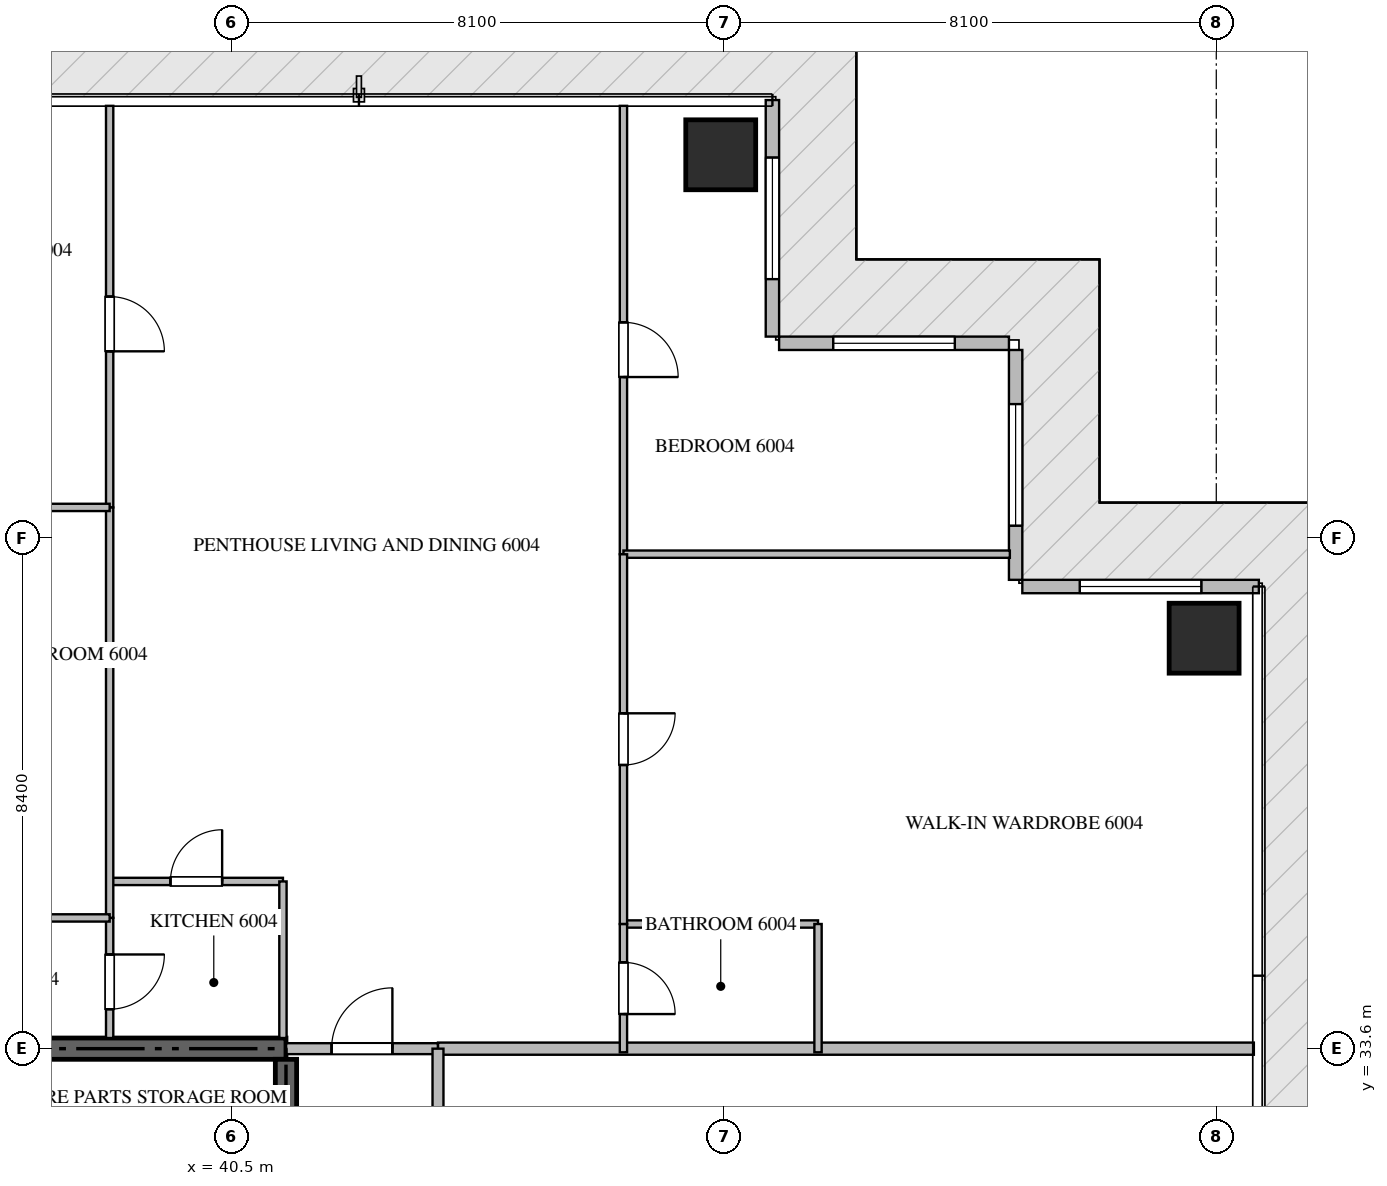
"""IFC4 building model, lengths in metres.
Left out: names, types, materials, properties, quantities, classifications, styles, units other than length and angle.
Written with IfcOpenShell. Run it as: python <this file> out.ifc"""

import sys

from ifc_helpers import new_model, si_unit, direction, frame, frame_2d, origin, origin_2d, place, context, subcontext, project, spatial, rectangle, extrude, source, transform, mapped, element, fill, save


model = new_model("IFC4")
c1 = context("Model", 3, precision=1e-05, world=origin(), true_north=direction((0.0, 1.0)))
c2 = subcontext(c1, "Body", "Model", "MODEL_VIEW")
j1 = project(units=[si_unit("LENGTHUNIT", "METRE"), si_unit("PLANEANGLEUNIT", "RADIAN")], contexts=[c1])
p1 = place(None, origin())
s1 = spatial("IfcSite", under=j1, at=p1, CompositionType="ELEMENT")
p2 = place(p1, origin())
s2 = spatial("IfcBuilding", under=s1, at=p2, CompositionType="ELEMENT")
p3 = place(p2, frame((0.0, 0.0, 241.25)))
s3 = spatial("IfcBuildingStorey", under=s2, at=p3, CompositionType="ELEMENT", Elevation=241.25)
p4 = place(p3, frame((41.4, 33.6, -0.26), z_axis=(0.0, 0.0, 1.0), x_axis=(-1.0, 0.0, 0.0)))
e1 = element("IfcWall", 1, at=p4, inside=s3, PredefinedType="SHEAR", context=c2, shape_type="SweptSolid", body=[
    extrude(rectangle(XDim=18.0, YDim=0.35, at=frame_2d((9.0, 0.0))), origin(), (0.0, 0.0, 1.0), 3.848),
])
p5 = place(p3, frame((41.4, 27.75, -0.26), z_axis=(0.0, 0.0, 1.0), x_axis=(0.0, 1.0, 0.0)))
e2 = element("IfcWall", 2, at=p5, inside=s3, PredefinedType="SHEAR", context=c2, shape_type="SweptSolid", body=[
    extrude(rectangle(XDim=5.675, YDim=0.35, at=frame_2d((2.837, 0.0))), origin(), (0.0, 0.0, 1.0), 3.848),
])
m1 = source(origin(), c2, "Body", "SweptSolid", [
    extrude(rectangle(XDim=1.15, YDim=1.15, at=origin_2d()), origin(), (0.0, 0.0, 1.0), 3.85),
])
for number, where, z_axis, x_axis in (
    (3, (48.55, 48.3, -0.26), (0.0, 0.0, 1.0), (1.0, 0.0, 0.0)),
    (4, (56.5, 40.35, -0.26), (0.0, 0.0, 1.0), (1.0, 0.0, 0.0)),
):
    element("IfcColumn", number, at=place(p3, frame(where, z_axis=z_axis, x_axis=x_axis)), inside=s3, PredefinedType="COLUMN", context=c2, shape_type="MappedRepresentation", body=[
        mapped(m1, transform((0.0, 0.0, 0.0), scale=1.0)),
    ])
p6 = place(p3, frame((57.4, 41.2, 0.0), z_axis=(0.0, 0.0, 1.0), x_axis=(-1.0, 0.0, 0.0)))
e5 = element("IfcWall", 5, at=p6, inside=s3, PredefinedType="ELEMENTEDWALL", context=c2, shape_type="SweptSolid", body=[
    extrude(rectangle(XDim=3.89, YDim=0.22, at=frame_2d((1.945, 0.0))), origin(), (0.0, 0.0, 1.0), 3.575),
])
p7 = place(p6, frame((0.945, 0.0, 0.65)))
e6 = element("IfcOpeningElement", 6, at=p7, cuts=e5, PredefinedType="OPENING", context=c2, shape_type="SweptSolid", body=[
    extrude(rectangle(XDim=2.0, YDim=2.2, at=frame_2d((1.0, 1.1))), frame((0.0, 0.12, 0.0), z_axis=(0.0, -1.0, 0.0), x_axis=(1.0, 0.0, 0.0)), (0.0, 0.0, 1.0), 0.24),
])
p8 = place(p3, frame((53.4, 41.31, 0.0), z_axis=(0.0, 0.0, 1.0), x_axis=(0.0, 1.0, 0.0)))
e7 = element("IfcWall", 7, at=p8, inside=s3, PredefinedType="ELEMENTEDWALL", context=c2, shape_type="SweptSolid", body=[
    extrude(rectangle(XDim=3.78, YDim=0.22, at=frame_2d((1.89, 0.0))), origin(), (0.0, 0.0, 1.0), 3.575),
])
p9 = place(p8, frame((0.89, 0.0, 0.65)))
e8 = element("IfcOpeningElement", 8, at=p9, cuts=e7, PredefinedType="OPENING", context=c2, shape_type="SweptSolid", body=[
    extrude(rectangle(XDim=2.0, YDim=2.2, at=frame_2d((1.0, 1.1))), frame((0.0, 0.12, 0.0), z_axis=(0.0, -1.0, 0.0), x_axis=(1.0, 0.0, 0.0)), (0.0, 0.0, 1.0), 0.24),
])
p10 = place(p3, frame((53.29, 45.2, 0.0), z_axis=(0.0, 0.0, 1.0), x_axis=(-1.0, 0.0, 0.0)))
e9 = element("IfcWall", 9, at=p10, inside=s3, PredefinedType="ELEMENTEDWALL", context=c2, shape_type="SweptSolid", body=[
    extrude(rectangle(XDim=3.78, YDim=0.22, at=frame_2d((1.89, 0.0))), origin(), (0.0, 0.0, 1.0), 3.575),
])
p11 = place(p10, frame((0.89, 0.0, 0.65)))
e10 = element("IfcOpeningElement", 10, at=p11, cuts=e9, PredefinedType="OPENING", context=c2, shape_type="SweptSolid", body=[
    extrude(rectangle(XDim=2.0, YDim=2.2, at=frame_2d((1.0, 1.1))), frame((0.0, 0.12, 0.0), z_axis=(0.0, -1.0, 0.0), x_axis=(1.0, 0.0, 0.0)), (0.0, 0.0, 1.0), 0.24),
])
p12 = place(p3, frame((49.4, 45.31, 0.0), z_axis=(0.0, 0.0, 1.0), x_axis=(0.0, 1.0, 0.0)))
e11 = element("IfcWall", 11, at=p12, inside=s3, PredefinedType="ELEMENTEDWALL", context=c2, shape_type="SweptSolid", body=[
    extrude(rectangle(XDim=3.89, YDim=0.22, at=frame_2d((1.945, 0.0))), origin(), (0.0, 0.0, 1.0), 3.575),
])
p13 = place(p12, frame((0.945, 0.0, 0.65)))
e12 = element("IfcOpeningElement", 12, at=p13, cuts=e11, PredefinedType="OPENING", context=c2, shape_type="SweptSolid", body=[
    extrude(rectangle(XDim=2.0, YDim=2.2, at=frame_2d((1.0, 1.1))), frame((0.0, 0.12, 0.0), z_axis=(0.0, -1.0, 0.0), x_axis=(1.0, 0.0, 0.0)), (0.0, 0.0, 1.0), 0.24),
])
p14 = place(p3, frame((43.9, 33.6, 0.0), z_axis=(0.0, 0.0, 1.0), x_axis=(1.0, 0.0, 0.0)))
e13 = element("IfcWall", 13, at=p14, inside=s3, PredefinedType="PARTITIONING", context=c2, shape_type="SweptSolid", body=[
    extrude(rectangle(XDim=13.418, YDim=0.2, at=frame_2d((6.709, 0.0))), origin(), (0.0, 0.0, 1.0), 3.59),
])
p15 = place(p3, frame((41.402, 33.6, 0.0), z_axis=(0.0, 0.0, 1.0), x_axis=(1.0, 0.0, 0.0)))
e14 = element("IfcWall", 14, at=p15, inside=s3, PredefinedType="PARTITIONING", context=c2, shape_type="SweptSolid", body=[
    extrude(rectangle(XDim=2.496, YDim=0.18, at=frame_2d((1.248, 0.0))), origin(), (0.0, 0.0, 1.0), 3.59),
])
p16 = place(p15, frame((0.748, 0.0, 0.0)))
e15 = element("IfcOpeningElement", 15, at=p16, cuts=e14, PredefinedType="OPENING", context=c2, shape_type="SweptSolid", body=[
    extrude(rectangle(XDim=1.0, YDim=2.15, at=frame_2d((0.5, 1.075))), frame((0.0, 0.1, 0.0), z_axis=(0.0, -1.0, 0.0), x_axis=(1.0, 0.0, 0.0)), (0.0, 0.0, 1.0), 0.2),
])
p17 = place(p3, frame((43.9, 16.8, 0.0), z_axis=(0.0, 0.0, 1.0), x_axis=(0.0, 1.0, 0.0)))
e16 = element("IfcWall", 16, at=p17, inside=s3, PredefinedType="PARTITIONING", context=c2, shape_type="SweptSolid", body=[
    extrude(rectangle(XDim=16.8, YDim=0.18, at=frame_2d((8.4, 0.0))), origin(), (0.0, 0.0, 1.0), 3.59),
])
p18 = place(p17, frame((4.993, 0.0, 0.0)))
e17 = element("IfcOpeningElement", 17, at=p18, cuts=e16, PredefinedType="OPENING", context=c2, shape_type="SweptSolid", body=[
    extrude(rectangle(XDim=1.0, YDim=2.15, at=frame_2d((0.5, 1.075))), frame((0.0, 0.1, 0.0), z_axis=(0.0, -1.0, 0.0), x_axis=(1.0, 0.0, 0.0)), (0.0, 0.0, 1.0), 0.2),
])
p19 = place(p17, frame((13.351, 0.0, 0.0)))
e18 = element("IfcOpeningElement", 18, at=p19, cuts=e16, PredefinedType="OPENING", context=c2, shape_type="SweptSolid", body=[
    extrude(rectangle(XDim=1.0, YDim=2.15, at=frame_2d((0.5, 1.075))), frame((0.0, 0.1, 0.0), z_axis=(0.0, -1.0, 0.0), x_axis=(1.0, 0.0, 0.0)), (0.0, 0.0, 1.0), 0.2),
])
p20 = place(p3, frame((38.5, 36.35, 0.0), z_axis=(0.0, 0.0, 1.0), x_axis=(1.0, 0.0, 0.0)))
e19 = element("IfcWall", 19, at=p20, inside=s3, PredefinedType="PARTITIONING", context=c2, shape_type="SweptSolid", body=[
    extrude(rectangle(XDim=2.85, YDim=0.12, at=frame_2d((1.425, 0.0))), origin(), (0.0, 0.0, 1.0), 3.59),
])
p21 = place(p20, frame((1.0, 0.0, 0.0)))
e20 = element("IfcOpeningElement", 20, at=p21, cuts=e19, PredefinedType="OPENING", context=c2, shape_type="SweptSolid", body=[
    extrude(rectangle(XDim=0.85, YDim=2.1, at=frame_2d((0.425, 1.05))), frame((0.0, 0.07, 0.0), z_axis=(0.0, -1.0, 0.0), x_axis=(1.0, 0.0, 0.0)), (0.0, 0.0, 1.0), 0.14),
])
p22 = place(p3, frame((41.35, 36.35, 0.0), z_axis=(0.0, 0.0, 1.0), x_axis=(0.0, -1.0, 0.0)))
e21 = element("IfcWall", 21, at=p22, inside=s3, PredefinedType="PARTITIONING", context=c2, shape_type="SweptSolid", body=[
    extrude(rectangle(XDim=2.575, YDim=0.12, at=frame_2d((1.288, 0.0))), origin(), (0.0, 0.0, 1.0), 3.59),
])
p23 = place(p3, frame((38.5, 35.75, 0.0), z_axis=(0.0, 0.0, 1.0), x_axis=(0.0, -1.0, 0.0)))
e22 = element("IfcWall", 22, at=p23, inside=s3, PredefinedType="PARTITIONING", context=c2, shape_type="SweptSolid", body=[
    extrude(rectangle(XDim=1.975, YDim=0.12, at=frame_2d((0.988, 0.0))), origin(), (0.0, 0.0, 1.0), 3.59),
])
p24 = place(p23, frame((0.601, 0.0, 0.0)))
e23 = element("IfcOpeningElement", 23, at=p24, cuts=e22, PredefinedType="OPENING", context=c2, shape_type="SweptSolid", body=[
    extrude(rectangle(XDim=0.9, YDim=2.1, at=frame_2d((0.45, 1.05))), frame((0.0, 0.07, 0.0), z_axis=(0.0, -1.0, 0.0), x_axis=(1.0, 0.0, 0.0)), (0.0, 0.0, 1.0), 0.14),
])
p25 = place(p3, frame((38.5, 49.105, 0.0), z_axis=(0.0, 0.0, 1.0), x_axis=(0.0, -1.0, 0.0)))
e24 = element("IfcWall", 24, at=p25, inside=s3, PredefinedType="PARTITIONING", context=c2, shape_type="SweptSolid", body=[
    extrude(rectangle(XDim=6.604, YDim=0.12, at=frame_2d((3.302, 0.0))), origin(), (0.0, 0.0, 1.0), 3.59),
])
p26 = place(p25, frame((3.137, 0.0, 0.0)))
e25 = element("IfcOpeningElement", 25, at=p26, cuts=e24, PredefinedType="OPENING", context=c2, shape_type="SweptSolid", body=[
    extrude(rectangle(XDim=0.9, YDim=2.1, at=frame_2d((0.45, 1.05))), frame((0.0, 0.07, 0.0), z_axis=(0.0, -1.0, 0.0), x_axis=(1.0, 0.0, 0.0)), (0.0, 0.0, 1.0), 0.14),
])
p27 = place(p3, frame((38.5, 42.499, 0.0), z_axis=(0.0, 0.0, 1.0), x_axis=(0.0, -1.0, 0.0)))
e26 = element("IfcWall", 26, at=p27, inside=s3, PredefinedType="PARTITIONING", context=c2, shape_type="SweptSolid", body=[
    extrude(rectangle(XDim=6.747, YDim=0.12, at=frame_2d((3.374, 0.0))), origin(), (0.0, 0.0, 1.0), 3.59),
])
p28 = place(p3, frame((33.38, 42.501, 0.0), z_axis=(0.0, 0.0, 1.0), x_axis=(1.0, 0.0, 0.0)))
e27 = element("IfcWall", 27, at=p28, inside=s3, PredefinedType="PARTITIONING", context=c2, shape_type="SweptSolid", body=[
    extrude(rectangle(XDim=5.12, YDim=0.12, at=frame_2d((2.56, 0.0))), origin(), (0.0, 0.0, 1.0), 3.59),
])
p29 = place(p3, frame((35.482, 35.75, 0.0), z_axis=(0.0, 0.0, 1.0), x_axis=(1.0, 0.0, 0.0)))
e28 = element("IfcWall", 28, at=p29, inside=s3, PredefinedType="PARTITIONING", context=c2, shape_type="SweptSolid", body=[
    extrude(rectangle(XDim=3.018, YDim=0.12, at=frame_2d((1.509, 0.0))), origin(), (0.0, 0.0, 1.0), 3.59),
])
p30 = place(p29, frame((1.084, 0.0, 0.0)))
e29 = element("IfcOpeningElement", 29, at=p30, cuts=e28, PredefinedType="OPENING", context=c2, shape_type="SweptSolid", body=[
    extrude(rectangle(XDim=0.85, YDim=2.1, at=frame_2d((0.425, 1.05))), frame((0.0, 0.07, 0.0), z_axis=(0.0, -1.0, 0.0), x_axis=(1.0, 0.0, 0.0)), (0.0, 0.0, 1.0), 0.14),
])
p31 = place(p3, frame((46.95, 49.105, 0.0), z_axis=(0.0, 0.0, 1.0), x_axis=(0.0, -1.0, 0.0)))
e30 = element("IfcWall", 30, at=p31, inside=s3, PredefinedType="PARTITIONING", context=c2, shape_type="SweptSolid", body=[
    extrude(rectangle(XDim=7.373, YDim=0.12, at=frame_2d((3.687, 0.0))), origin(), (0.0, 0.0, 1.0), 3.59),
])
p32 = place(p31, frame((3.56, 0.0, 0.0)))
e31 = element("IfcOpeningElement", 31, at=p32, cuts=e30, PredefinedType="OPENING", context=c2, shape_type="SweptSolid", body=[
    extrude(rectangle(XDim=0.9, YDim=2.1, at=frame_2d((0.45, 1.05))), frame((0.0, 0.07, 0.0), z_axis=(0.0, -1.0, 0.0), x_axis=(1.0, 0.0, 0.0)), (0.0, 0.0, 1.0), 0.14),
])
p33 = place(p3, frame((46.95, 41.732, 0.0), z_axis=(0.0, 0.0, 1.0), x_axis=(1.0, 0.0, 0.0)))
e32 = element("IfcWall", 32, at=p33, inside=s3, PredefinedType="PARTITIONING", context=c2, shape_type="SweptSolid", body=[
    extrude(rectangle(XDim=6.355, YDim=0.12, at=frame_2d((3.177, 0.0))), origin(), (0.0, 0.0, 1.0), 3.59),
])
p34 = place(p3, frame((46.95, 35.65, 0.0), z_axis=(0.0, 0.0, 1.0), x_axis=(1.0, 0.0, 0.0)))
e33 = element("IfcWall", 33, at=p34, inside=s3, PredefinedType="PARTITIONING", context=c2, shape_type="SweptSolid", body=[
    extrude(rectangle(XDim=3.2, YDim=0.12, at=frame_2d((1.6, 0.0))), origin(), (0.0, 0.0, 1.0), 3.59),
])
p35 = place(p3, frame((50.15, 35.65, 0.0), z_axis=(0.0, 0.0, 1.0), x_axis=(0.0, -1.0, 0.0)))
e34 = element("IfcWall", 34, at=p35, inside=s3, PredefinedType="PARTITIONING", context=c2, shape_type="SweptSolid", body=[
    extrude(rectangle(XDim=2.11, YDim=0.12, at=frame_2d((1.055, 0.0))), origin(), (0.0, 0.0, 1.0), 3.59),
])
p36 = place(p3, frame((46.95, 41.73, 0.0), z_axis=(0.0, 0.0, 1.0), x_axis=(0.0, -1.0, 0.0)))
e35 = element("IfcWall", 35, at=p36, inside=s3, PredefinedType="PARTITIONING", context=c2, shape_type="SweptSolid", body=[
    extrude(rectangle(XDim=6.08, YDim=0.12, at=frame_2d((3.04, 0.0))), origin(), (0.0, 0.0, 1.0), 3.59),
])
p37 = place(p36, frame((2.615, 0.0, 0.0)))
e36 = element("IfcOpeningElement", 36, at=p37, cuts=e35, PredefinedType="OPENING", context=c2, shape_type="SweptSolid", body=[
    extrude(rectangle(XDim=0.85, YDim=2.1, at=frame_2d((0.425, 1.05))), frame((0.0, 0.07, 0.0), z_axis=(0.0, -1.0, 0.0), x_axis=(1.0, 0.0, 0.0)), (0.0, 0.0, 1.0), 0.14),
])
p38 = place(p3, frame((46.95, 35.648, 0.0), z_axis=(0.0, 0.0, 1.0), x_axis=(0.0, -1.0, 0.0)))
e37 = element("IfcWall", 37, at=p38, inside=s3, PredefinedType="PARTITIONING", context=c2, shape_type="SweptSolid", body=[
    extrude(rectangle(XDim=2.108, YDim=0.12, at=frame_2d((1.054, 0.0))), origin(), (0.0, 0.0, 1.0), 3.59),
])
p39 = place(p38, frame((0.629, 0.0, 0.0)))
e38 = element("IfcOpeningElement", 38, at=p39, cuts=e37, PredefinedType="OPENING", context=c2, shape_type="SweptSolid", body=[
    extrude(rectangle(XDim=0.85, YDim=2.1, at=frame_2d((0.425, 1.05))), frame((0.0, 0.07, 0.0), z_axis=(0.0, -1.0, 0.0), x_axis=(1.0, 0.0, 0.0)), (0.0, 0.0, 1.0), 0.14),
])
m2 = source(origin(), c2, "Body", "SweptSolid", [
    extrude(rectangle(XDim=2.0, YDim=2.2, at=frame_2d((1.0, 1.1))), frame((0.0, 0.03, 0.0), z_axis=(0.0, -1.0, 0.0), x_axis=(1.0, 0.0, 0.0)), (0.0, 0.0, 1.0), 0.06),
])
p40 = place(p7, origin())
e39 = element("IfcWindow", 39, at=p40, inside=s3, PartitioningType="SINGLE_PANEL", PredefinedType="WINDOW", context=c2, shape_type="MappedRepresentation", body=[
    mapped(m2, transform((0.0, 0.0, 0.0), scale=1.0)),
])
fill(e6, e39)
p41 = place(p9, origin())
e40 = element("IfcWindow", 40, at=p41, inside=s3, PartitioningType="SINGLE_PANEL", PredefinedType="WINDOW", context=c2, shape_type="MappedRepresentation", body=[
    mapped(m2, transform((0.0, 0.0, 0.0), scale=1.0)),
])
fill(e8, e40)
p42 = place(p11, origin())
e41 = element("IfcWindow", 41, at=p42, inside=s3, PartitioningType="SINGLE_PANEL", PredefinedType="WINDOW", context=c2, shape_type="MappedRepresentation", body=[
    mapped(m2, transform((0.0, 0.0, 0.0), scale=1.0)),
])
fill(e10, e41)
p43 = place(p13, origin())
e42 = element("IfcWindow", 42, at=p43, inside=s3, PartitioningType="SINGLE_PANEL", PredefinedType="WINDOW", context=c2, shape_type="MappedRepresentation", body=[
    mapped(m2, transform((0.0, 0.0, 0.0), scale=1.0)),
])
fill(e12, e42)
m3 = source(origin(), c2, "Body", "SweptSolid", [
    extrude(rectangle(XDim=1.0, YDim=2.15, at=frame_2d((0.5, 1.075))), frame((0.0, 0.025, 0.0), z_axis=(0.0, -1.0, 0.0), x_axis=(1.0, 0.0, 0.0)), (0.0, 0.0, 1.0), 0.05),
])
p44 = place(p16, origin())
e43 = element("IfcDoor", 43, at=p44, inside=s3, OperationType="SINGLE_SWING_RIGHT", PredefinedType="DOOR", context=c2, shape_type="MappedRepresentation", body=[
    mapped(m3, transform((0.0, 0.0, 0.0), scale=1.0)),
])
fill(e15, e43)
m4 = source(origin(), c2, "Body", "SweptSolid", [
    extrude(rectangle(XDim=0.85, YDim=2.1, at=frame_2d((0.425, 1.05))), frame((0.0, 0.025, 0.0), z_axis=(0.0, -1.0, 0.0), x_axis=(1.0, 0.0, 0.0)), (0.0, 0.0, 1.0), 0.05),
])
p45 = place(p21, origin())
e44 = element("IfcDoor", 44, at=p45, inside=s3, OperationType="SINGLE_SWING_RIGHT", PredefinedType="DOOR", context=c2, shape_type="MappedRepresentation", body=[
    mapped(m4, transform((0.0, 0.0, 0.0), scale=1.0)),
])
fill(e20, e44)
m5 = source(origin(), c2, "Body", "SweptSolid", [
    extrude(rectangle(XDim=0.9, YDim=2.1, at=frame_2d((0.45, 1.05))), frame((0.0, 0.025, 0.0), z_axis=(0.0, -1.0, 0.0), x_axis=(1.0, 0.0, 0.0)), (0.0, 0.0, 1.0), 0.05),
])
p46 = place(p24, origin())
e45 = element("IfcDoor", 45, at=p46, inside=s3, OperationType="SINGLE_SWING_LEFT", PredefinedType="DOOR", context=c2, shape_type="MappedRepresentation", body=[
    mapped(m5, transform((0.0, 0.0, 0.0), scale=1.0)),
])
fill(e23, e45)
p47 = place(p26, origin())
e46 = element("IfcDoor", 46, at=p47, inside=s3, OperationType="SINGLE_SWING_RIGHT", PredefinedType="DOOR", context=c2, shape_type="MappedRepresentation", body=[
    mapped(m5, transform((0.0, 0.0, 0.0), scale=1.0)),
])
fill(e25, e46)
p48 = place(p32, origin())
e47 = element("IfcDoor", 47, at=p48, inside=s3, OperationType="SINGLE_SWING_RIGHT", PredefinedType="DOOR", context=c2, shape_type="MappedRepresentation", body=[
    mapped(m5, transform((0.0, 0.0, 0.0), scale=1.0)),
])
fill(e31, e47)
p49 = place(p37, origin())
e48 = element("IfcDoor", 48, at=p49, inside=s3, OperationType="SINGLE_SWING_LEFT", PredefinedType="DOOR", context=c2, shape_type="MappedRepresentation", body=[
    mapped(m4, transform((0.0, 0.0, 0.0), scale=1.0)),
])
fill(e36, e48)
p50 = place(p39, origin())
e49 = element("IfcDoor", 49, at=p50, inside=s3, OperationType="SINGLE_SWING_RIGHT", PredefinedType="DOOR", context=c2, shape_type="MappedRepresentation", body=[
    mapped(m4, transform((0.0, 0.0, 0.0), scale=1.0)),
])
fill(e38, e49)
save(model, sys.argv[1])
